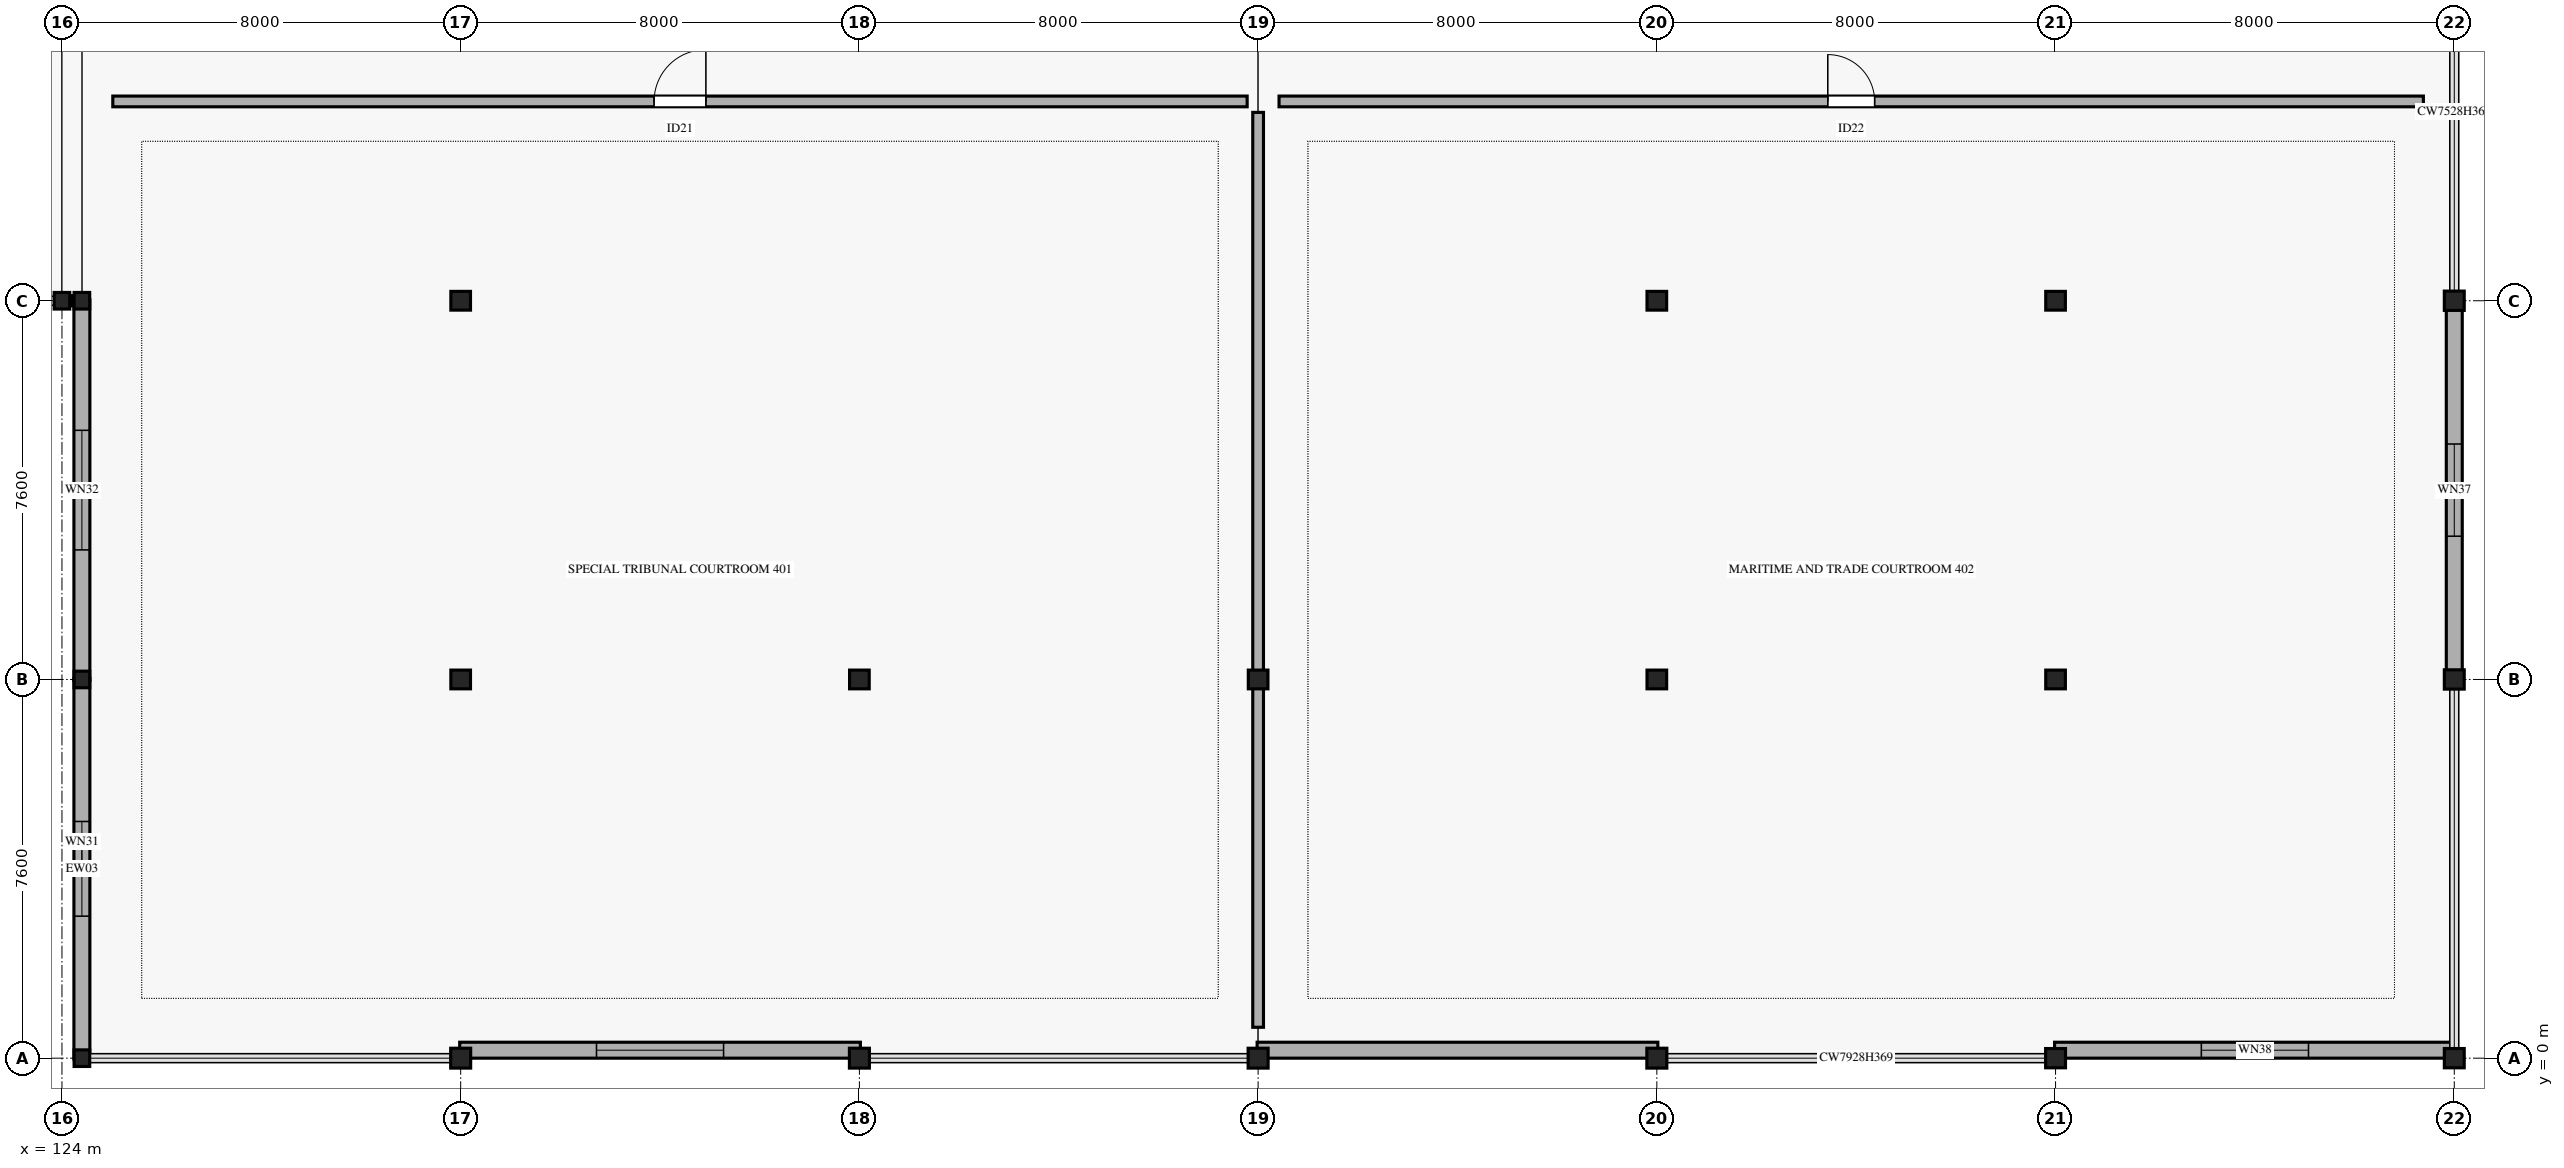
"""IFC4 building model, lengths in metres.
Left out: names, types, materials, properties, quantities, classifications, styles, units other than length and angle.
Written with IfcOpenShell. Run it as: python <this file> out.ifc"""

import sys

from ifc_helpers import new_model, si_unit, direction, frame, frame_2d, origin, origin_2d, place, context, subcontext, project, spatial, rectangle, i_section, extrude, element, fill, save


model = new_model("IFC4")
c1 = context("Model", 3, precision=1e-05, world=origin(), true_north=direction((0.0, 1.0)))
c2 = subcontext(c1, "Body", "Model", "MODEL_VIEW")
j1 = project(units=[si_unit("LENGTHUNIT", "METRE"), si_unit("PLANEANGLEUNIT", "RADIAN")], contexts=[c1])
p1 = place(None, origin())
s1 = spatial("IfcSite", under=j1, at=p1, CompositionType="ELEMENT")
p2 = place(p1, origin())
s2 = spatial("IfcBuilding", under=s1, at=p2, CompositionType="ELEMENT")
p3 = place(p2, frame((0.0, 0.0, 15.6)))
s3 = spatial("IfcBuildingStorey", under=s2, at=p3, CompositionType="ELEMENT", Elevation=15.6)
for number, where, z_axis, x_axis in (
    (1, (124.4, 0.0, 0.0), (0.0, 0.0, 1.0), (1.0, 0.0, 0.0)),
    (2, (124.4, 7.6, 0.0), (0.0, 0.0, 1.0), (1.0, 0.0, 0.0)),
    (3, (124.4, 15.2, 0.0), (0.0, 0.0, 1.0), (1.0, 0.0, 0.0)),
):
    element("IfcColumn", number, at=place(p3, frame(where, z_axis=z_axis, x_axis=x_axis)), inside=s3, PredefinedType="COLUMN", context=c2, shape_type="SweptSolid", body=[
        extrude(i_section(OverallWidth=0.313, OverallDepth=0.333, WebThickness=0.018, FlangeThickness=0.028, FilletRadius=0.015, at=origin_2d()), origin(), (0.0, 0.0, 1.0), 4.595),
    ])
p4 = place(p3, frame((132.0, 0.0, 0.0), z_axis=(0.0, 0.0, 1.0), x_axis=(1.0, 0.0, 0.0)))
e4 = element("IfcColumn", 4, at=p4, inside=s3, PredefinedType="COLUMN", context=c2, shape_type="SweptSolid", body=[
    extrude(i_section(OverallWidth=0.401, OverallDepth=0.399, WebThickness=0.025, FlangeThickness=0.04, FilletRadius=0.015, at=origin_2d()), origin(), (0.0, 0.0, 1.0), 4.595),
])
for number, where, z_axis, x_axis in (
    (5, (132.0, 7.6, 0.0), (0.0, 0.0, 1.0), (1.0, 0.0, 0.0)),
    (6, (132.0, 15.2, 0.0), (0.0, 0.0, 1.0), (1.0, 0.0, 0.0)),
):
    element("IfcColumn", number, at=place(p3, frame(where, z_axis=z_axis, x_axis=x_axis)), inside=s3, PredefinedType="COLUMN", context=c2, shape_type="SweptSolid", body=[
        extrude(i_section(OverallWidth=0.394, OverallDepth=0.376, WebThickness=0.017, FlangeThickness=0.028, FilletRadius=0.015, at=origin_2d()), origin(), (0.0, 0.0, 1.0), 4.595),
    ])
p5 = place(p3, frame((140.0, 0.0, 0.0), z_axis=(0.0, 0.0, 1.0), x_axis=(1.0, 0.0, 0.0)))
e7 = element("IfcColumn", 7, at=p5, inside=s3, PredefinedType="COLUMN", context=c2, shape_type="SweptSolid", body=[
    extrude(i_section(OverallWidth=0.401, OverallDepth=0.399, WebThickness=0.025, FlangeThickness=0.04, FilletRadius=0.015, at=origin_2d()), origin(), (0.0, 0.0, 1.0), 4.595),
])
p6 = place(p3, frame((140.0, 7.6, 0.0), z_axis=(0.0, 0.0, 1.0), x_axis=(1.0, 0.0, 0.0)))
e8 = element("IfcColumn", 8, at=p6, inside=s3, PredefinedType="COLUMN", context=c2, shape_type="SweptSolid", body=[
    extrude(i_section(OverallWidth=0.394, OverallDepth=0.376, WebThickness=0.017, FlangeThickness=0.028, FilletRadius=0.015, at=origin_2d()), origin(), (0.0, 0.0, 1.0), 4.595),
])
p7 = place(p3, frame((148.0, 0.0, 0.0), z_axis=(0.0, 0.0, 1.0), x_axis=(1.0, 0.0, 0.0)))
e9 = element("IfcColumn", 9, at=p7, inside=s3, PredefinedType="COLUMN", context=c2, shape_type="SweptSolid", body=[
    extrude(i_section(OverallWidth=0.401, OverallDepth=0.399, WebThickness=0.025, FlangeThickness=0.04, FilletRadius=0.015, at=origin_2d()), origin(), (0.0, 0.0, 1.0), 4.595),
])
p8 = place(p3, frame((148.0, 7.6, 0.0), z_axis=(0.0, 0.0, 1.0), x_axis=(1.0, 0.0, 0.0)))
e10 = element("IfcColumn", 10, at=p8, inside=s3, PredefinedType="COLUMN", context=c2, shape_type="SweptSolid", body=[
    extrude(i_section(OverallWidth=0.394, OverallDepth=0.376, WebThickness=0.017, FlangeThickness=0.028, FilletRadius=0.015, at=origin_2d()), origin(), (0.0, 0.0, 1.0), 4.595),
])
p9 = place(p3, frame((156.0, 0.0, 0.0), z_axis=(0.0, 0.0, 1.0), x_axis=(1.0, 0.0, 0.0)))
e11 = element("IfcColumn", 11, at=p9, inside=s3, PredefinedType="COLUMN", context=c2, shape_type="SweptSolid", body=[
    extrude(i_section(OverallWidth=0.401, OverallDepth=0.399, WebThickness=0.025, FlangeThickness=0.04, FilletRadius=0.015, at=origin_2d()), origin(), (0.0, 0.0, 1.0), 4.595),
])
for number, where, z_axis, x_axis in (
    (12, (156.0, 7.6, 0.0), (0.0, 0.0, 1.0), (1.0, 0.0, 0.0)),
    (13, (156.0, 15.2, 0.0), (0.0, 0.0, 1.0), (1.0, 0.0, 0.0)),
):
    element("IfcColumn", number, at=place(p3, frame(where, z_axis=z_axis, x_axis=x_axis)), inside=s3, PredefinedType="COLUMN", context=c2, shape_type="SweptSolid", body=[
        extrude(i_section(OverallWidth=0.394, OverallDepth=0.376, WebThickness=0.017, FlangeThickness=0.028, FilletRadius=0.015, at=origin_2d()), origin(), (0.0, 0.0, 1.0), 4.595),
    ])
p10 = place(p3, frame((164.0, 0.0, 0.0), z_axis=(0.0, 0.0, 1.0), x_axis=(1.0, 0.0, 0.0)))
e14 = element("IfcColumn", 14, at=p10, inside=s3, PredefinedType="COLUMN", context=c2, shape_type="SweptSolid", body=[
    extrude(i_section(OverallWidth=0.399, OverallDepth=0.387, WebThickness=0.021, FlangeThickness=0.033, FilletRadius=0.015, at=origin_2d()), origin(), (0.0, 0.0, 1.0), 4.595),
])
for number, where, z_axis, x_axis in (
    (15, (164.0, 7.6, 0.0), (0.0, 0.0, 1.0), (1.0, 0.0, 0.0)),
    (16, (164.0, 15.2, 0.0), (0.0, 0.0, 1.0), (1.0, 0.0, 0.0)),
):
    element("IfcColumn", number, at=place(p3, frame(where, z_axis=z_axis, x_axis=x_axis)), inside=s3, PredefinedType="COLUMN", context=c2, shape_type="SweptSolid", body=[
        extrude(i_section(OverallWidth=0.394, OverallDepth=0.376, WebThickness=0.017, FlangeThickness=0.028, FilletRadius=0.015, at=origin_2d()), origin(), (0.0, 0.0, 1.0), 4.595),
    ])
for number, where, z_axis, x_axis in (
    (17, (172.0, 0.0, 0.0), (0.0, 0.0, 1.0), (1.0, 0.0, 0.0)),
    (18, (172.0, 7.6, 0.0), (0.0, 0.0, 1.0), (1.0, 0.0, 0.0)),
    (19, (172.0, 15.2, 0.0), (0.0, 0.0, 1.0), (1.0, 0.0, 0.0)),
):
    element("IfcColumn", number, at=place(p3, frame(where, z_axis=z_axis, x_axis=x_axis)), inside=s3, PredefinedType="COLUMN", context=c2, shape_type="SweptSolid", body=[
        extrude(i_section(OverallWidth=0.399, OverallDepth=0.387, WebThickness=0.021, FlangeThickness=0.033, FilletRadius=0.015, at=origin_2d()), origin(), (0.0, 0.0, 1.0), 4.595),
    ])
p11 = place(p3, frame((124.0, 15.2, 0.0), z_axis=(0.0, 0.0, 1.0), x_axis=(1.0, 0.0, 0.0)))
e20 = element("IfcColumn", 20, at=p11, inside=s3, PredefinedType="COLUMN", context=c2, shape_type="SweptSolid", body=[
    extrude(i_section(OverallWidth=0.313, OverallDepth=0.333, WebThickness=0.018, FlangeThickness=0.028, FilletRadius=0.015, at=origin_2d()), origin(), (0.0, 0.0, 1.0), 4.59),
])
p12 = place(p3, frame((124.4, -0.02, 0.0), z_axis=(0.0, 0.0, 1.0), x_axis=(0.0, 1.0, 0.0)))
e21 = element("IfcWall", 21, at=p12, inside=s3, PredefinedType="STANDARD", context=c2, shape_type="SweptSolid", body=[
    extrude(rectangle(XDim=7.64, YDim=0.32, at=frame_2d((3.82, 0.0))), origin(), (0.0, 0.0, 1.0), 3.66),
])
p13 = place(p12, frame((2.87, 0.0, 0.75)))
e22 = element("IfcOpeningElement", 22, at=p13, cuts=e21, PredefinedType="OPENING", context=c2, shape_type="SweptSolid", body=[
    extrude(rectangle(XDim=1.9, YDim=1.3, at=frame_2d((0.95, 0.65))), frame((0.0, 0.17, 0.0), z_axis=(0.0, -1.0, 0.0), x_axis=(1.0, 0.0, 0.0)), (0.0, 0.0, 1.0), 0.34),
])
p14 = place(p3, frame((124.4, 7.58, 0.0), z_axis=(0.0, 0.0, 1.0), x_axis=(0.0, 1.0, 0.0)))
e23 = element("IfcWall", 23, at=p14, inside=s3, PredefinedType="STANDARD", context=c2, shape_type="SweptSolid", body=[
    extrude(rectangle(XDim=7.64, YDim=0.32, at=frame_2d((3.82, 0.0))), origin(), (0.0, 0.0, 1.0), 3.66),
])
p15 = place(p14, frame((2.62, 0.0, 0.75)))
e24 = element("IfcOpeningElement", 24, at=p15, cuts=e23, PredefinedType="OPENING", context=c2, shape_type="SweptSolid", body=[
    extrude(rectangle(XDim=2.4, YDim=1.3, at=frame_2d((1.2, 0.65))), frame((0.0, 0.17, 0.0), z_axis=(0.0, -1.0, 0.0), x_axis=(1.0, 0.0, 0.0)), (0.0, 0.0, 1.0), 0.34),
])
p16 = place(p3, frame((172.0, 15.22, 0.0), z_axis=(0.0, 0.0, 1.0), x_axis=(0.0, -1.0, 0.0)))
e25 = element("IfcWall", 25, at=p16, inside=s3, PredefinedType="STANDARD", context=c2, shape_type="SweptSolid", body=[
    extrude(rectangle(XDim=7.64, YDim=0.32, at=frame_2d((3.82, 0.0))), origin(), (0.0, 0.0, 1.0), 3.66),
])
p17 = place(p16, frame((2.895, 0.0, 0.75)))
e26 = element("IfcOpeningElement", 26, at=p17, cuts=e25, PredefinedType="OPENING", context=c2, shape_type="SweptSolid", body=[
    extrude(rectangle(XDim=1.85, YDim=1.9, at=frame_2d((0.925, 0.95))), frame((0.0, 0.17, 0.0), z_axis=(0.0, -1.0, 0.0), x_axis=(1.0, 0.0, 0.0)), (0.0, 0.0, 1.0), 0.34),
])
p18 = place(p3, frame((172.02, 0.16, 0.0), z_axis=(0.0, 0.0, 1.0), x_axis=(-1.0, 0.0, 0.0)))
e27 = element("IfcWall", 27, at=p18, inside=s3, PredefinedType="STANDARD", context=c2, shape_type="SweptSolid", body=[
    extrude(rectangle(XDim=8.04, YDim=0.32, at=frame_2d((4.02, 0.0))), origin(), (0.0, 0.0, 1.0), 3.66),
])
p19 = place(p18, frame((2.945, 0.0, 0.75)))
e28 = element("IfcOpeningElement", 28, at=p19, cuts=e27, PredefinedType="OPENING", context=c2, shape_type="SweptSolid", body=[
    extrude(rectangle(XDim=2.15, YDim=1.9, at=frame_2d((1.075, 0.95))), frame((0.0, 0.17, 0.0), z_axis=(0.0, -1.0, 0.0), x_axis=(1.0, 0.0, 0.0)), (0.0, 0.0, 1.0), 0.34),
])
p20 = place(p3, frame((156.02, 0.16, 0.0), z_axis=(0.0, 0.0, 1.0), x_axis=(-1.0, 0.0, 0.0)))
e29 = element("IfcWall", 29, at=p20, inside=s3, PredefinedType="STANDARD", context=c2, shape_type="SweptSolid", body=[
    extrude(rectangle(XDim=8.04, YDim=0.32, at=frame_2d((4.02, 0.0))), origin(), (0.0, 0.0, 1.0), 3.66),
])
p21 = place(p3, frame((140.02, 0.16, 0.0), z_axis=(0.0, 0.0, 1.0), x_axis=(-1.0, 0.0, 0.0)))
e30 = element("IfcWall", 30, at=p21, inside=s3, PredefinedType="STANDARD", context=c2, shape_type="SweptSolid", body=[
    extrude(rectangle(XDim=8.04, YDim=0.32, at=frame_2d((4.02, 0.0))), origin(), (0.0, 0.0, 1.0), 3.66),
])
p22 = place(p21, frame((2.745, 0.0, 0.75)))
e31 = element("IfcOpeningElement", 31, at=p22, cuts=e30, PredefinedType="OPENING", context=c2, shape_type="SweptSolid", body=[
    extrude(rectangle(XDim=2.55, YDim=1.9, at=frame_2d((1.275, 0.95))), frame((0.0, 0.17, 0.0), z_axis=(0.0, -1.0, 0.0), x_axis=(1.0, 0.0, 0.0)), (0.0, 0.0, 1.0), 0.34),
])
p23 = place(p3, frame((124.22, 15.2, 0.0), z_axis=(0.0, 0.0, 1.0), x_axis=(-1.0, 0.0, 0.0)))
e32 = element("IfcWall", 32, at=p23, inside=s3, PredefinedType="STANDARD", context=c2, shape_type="SweptSolid", body=[
    extrude(rectangle(XDim=0.04, YDim=0.205, at=frame_2d((0.02, 0.0))), origin(), (0.0, 0.0, 1.0), 4.02),
])
p24 = place(p3, frame((125.02, 19.2, 0.0), z_axis=(0.0, 0.0, 1.0), x_axis=(1.0, 0.0, 0.0)))
e33 = element("IfcWall", 33, at=p24, inside=s3, PredefinedType="PARTITIONING", context=c2, shape_type="SweptSolid", body=[
    extrude(rectangle(XDim=22.76, YDim=0.215, at=frame_2d((11.38, 0.0))), origin(), (0.0, 0.0, 1.0), 3.45),
])
p25 = place(p24, frame((10.86, 0.0, 0.0)))
e34 = element("IfcOpeningElement", 34, at=p25, cuts=e33, PredefinedType="OPENING", context=c2, shape_type="SweptSolid", body=[
    extrude(rectangle(XDim=1.04, YDim=2.2, at=frame_2d((0.52, 1.1))), frame((0.0, 0.117, 0.0), z_axis=(0.0, -1.0, 0.0), x_axis=(1.0, 0.0, 0.0)), (0.0, 0.0, 1.0), 0.235),
])
p26 = place(p3, frame((148.0, 0.62, 0.0), z_axis=(0.0, 0.0, 1.0), x_axis=(0.0, 1.0, 0.0)))
e35 = element("IfcWall", 35, at=p26, inside=s3, PredefinedType="PARTITIONING", context=c2, shape_type="SweptSolid", body=[
    extrude(rectangle(XDim=18.36, YDim=0.215, at=frame_2d((9.18, 0.0))), origin(), (0.0, 0.0, 1.0), 3.45),
])
p27 = place(p3, frame((148.42, 19.2, 0.0), z_axis=(0.0, 0.0, 1.0), x_axis=(1.0, 0.0, 0.0)))
e36 = element("IfcWall", 36, at=p27, inside=s3, PredefinedType="PARTITIONING", context=c2, shape_type="SweptSolid", body=[
    extrude(rectangle(XDim=22.96, YDim=0.215, at=frame_2d((11.48, 0.0))), origin(), (0.0, 0.0, 1.0), 3.45),
])
p28 = place(p27, frame((11.01, 0.0, 0.0)))
e37 = element("IfcOpeningElement", 37, at=p28, cuts=e36, PredefinedType="OPENING", context=c2, shape_type="SweptSolid", body=[
    extrude(rectangle(XDim=0.94, YDim=2.2, at=frame_2d((0.47, 1.1))), frame((0.0, 0.117, 0.0), z_axis=(0.0, -1.0, 0.0), x_axis=(1.0, 0.0, 0.0)), (0.0, 0.0, 1.0), 0.235),
])
p29 = place(p13, origin())
e38 = element("IfcWindow", 38, at=p29, inside=s3, PartitioningType="SINGLE_PANEL", PredefinedType="WINDOW", context=c2, shape_type="SweptSolid", body=[
    extrude(rectangle(XDim=1.9, YDim=1.3, at=frame_2d((0.95, 0.65))), frame((0.0, 0.03, 0.0), z_axis=(0.0, -1.0, 0.0), x_axis=(1.0, 0.0, 0.0)), (0.0, 0.0, 1.0), 0.06),
])
fill(e22, e38)
p30 = place(p15, origin())
e39 = element("IfcWindow", 39, at=p30, inside=s3, PartitioningType="SINGLE_PANEL", PredefinedType="WINDOW", context=c2, shape_type="SweptSolid", body=[
    extrude(rectangle(XDim=2.4, YDim=1.3, at=frame_2d((1.2, 0.65))), frame((0.0, 0.03, 0.0), z_axis=(0.0, -1.0, 0.0), x_axis=(1.0, 0.0, 0.0)), (0.0, 0.0, 1.0), 0.06),
])
fill(e24, e39)
p31 = place(p17, origin())
e40 = element("IfcWindow", 40, at=p31, inside=s3, PartitioningType="SINGLE_PANEL", PredefinedType="WINDOW", context=c2, shape_type="SweptSolid", body=[
    extrude(rectangle(XDim=1.85, YDim=1.9, at=frame_2d((0.925, 0.95))), frame((0.0, 0.03, 0.0), z_axis=(0.0, -1.0, 0.0), x_axis=(1.0, 0.0, 0.0)), (0.0, 0.0, 1.0), 0.06),
])
fill(e26, e40)
p32 = place(p19, origin())
e41 = element("IfcWindow", 41, at=p32, inside=s3, PartitioningType="SINGLE_PANEL", PredefinedType="WINDOW", context=c2, shape_type="SweptSolid", body=[
    extrude(rectangle(XDim=2.15, YDim=1.9, at=frame_2d((1.075, 0.95))), frame((0.0, 0.03, 0.0), z_axis=(0.0, -1.0, 0.0), x_axis=(1.0, 0.0, 0.0)), (0.0, 0.0, 1.0), 0.06),
])
fill(e28, e41)
p33 = place(p22, origin())
e42 = element("IfcWindow", 42, at=p33, inside=s3, PartitioningType="SINGLE_PANEL", PredefinedType="WINDOW", context=c2, shape_type="SweptSolid", body=[
    extrude(rectangle(XDim=2.55, YDim=1.9, at=frame_2d((1.275, 0.95))), frame((0.0, 0.03, 0.0), z_axis=(0.0, -1.0, 0.0), x_axis=(1.0, 0.0, 0.0)), (0.0, 0.0, 1.0), 0.06),
])
fill(e31, e42)
p34 = place(p25, origin())
e43 = element("IfcDoor", 43, at=p34, inside=s3, OperationType="SINGLE_SWING_RIGHT", PredefinedType="DOOR", context=c2, shape_type="SweptSolid", body=[
    extrude(rectangle(XDim=1.04, YDim=2.2, at=frame_2d((0.52, 1.1))), frame((0.0, 0.025, 0.0), z_axis=(0.0, -1.0, 0.0), x_axis=(1.0, 0.0, 0.0)), (0.0, 0.0, 1.0), 0.05),
])
fill(e34, e43)
p35 = place(p28, origin())
e44 = element("IfcDoor", 44, at=p35, inside=s3, OperationType="SINGLE_SWING_LEFT", PredefinedType="DOOR", context=c2, shape_type="SweptSolid", body=[
    extrude(rectangle(XDim=0.94, YDim=2.2, at=frame_2d((0.47, 1.1))), frame((0.0, 0.025, 0.0), z_axis=(0.0, -1.0, 0.0), x_axis=(1.0, 0.0, 0.0)), (0.0, 0.0, 1.0), 0.05),
])
fill(e37, e44)
save(model, sys.argv[1])
